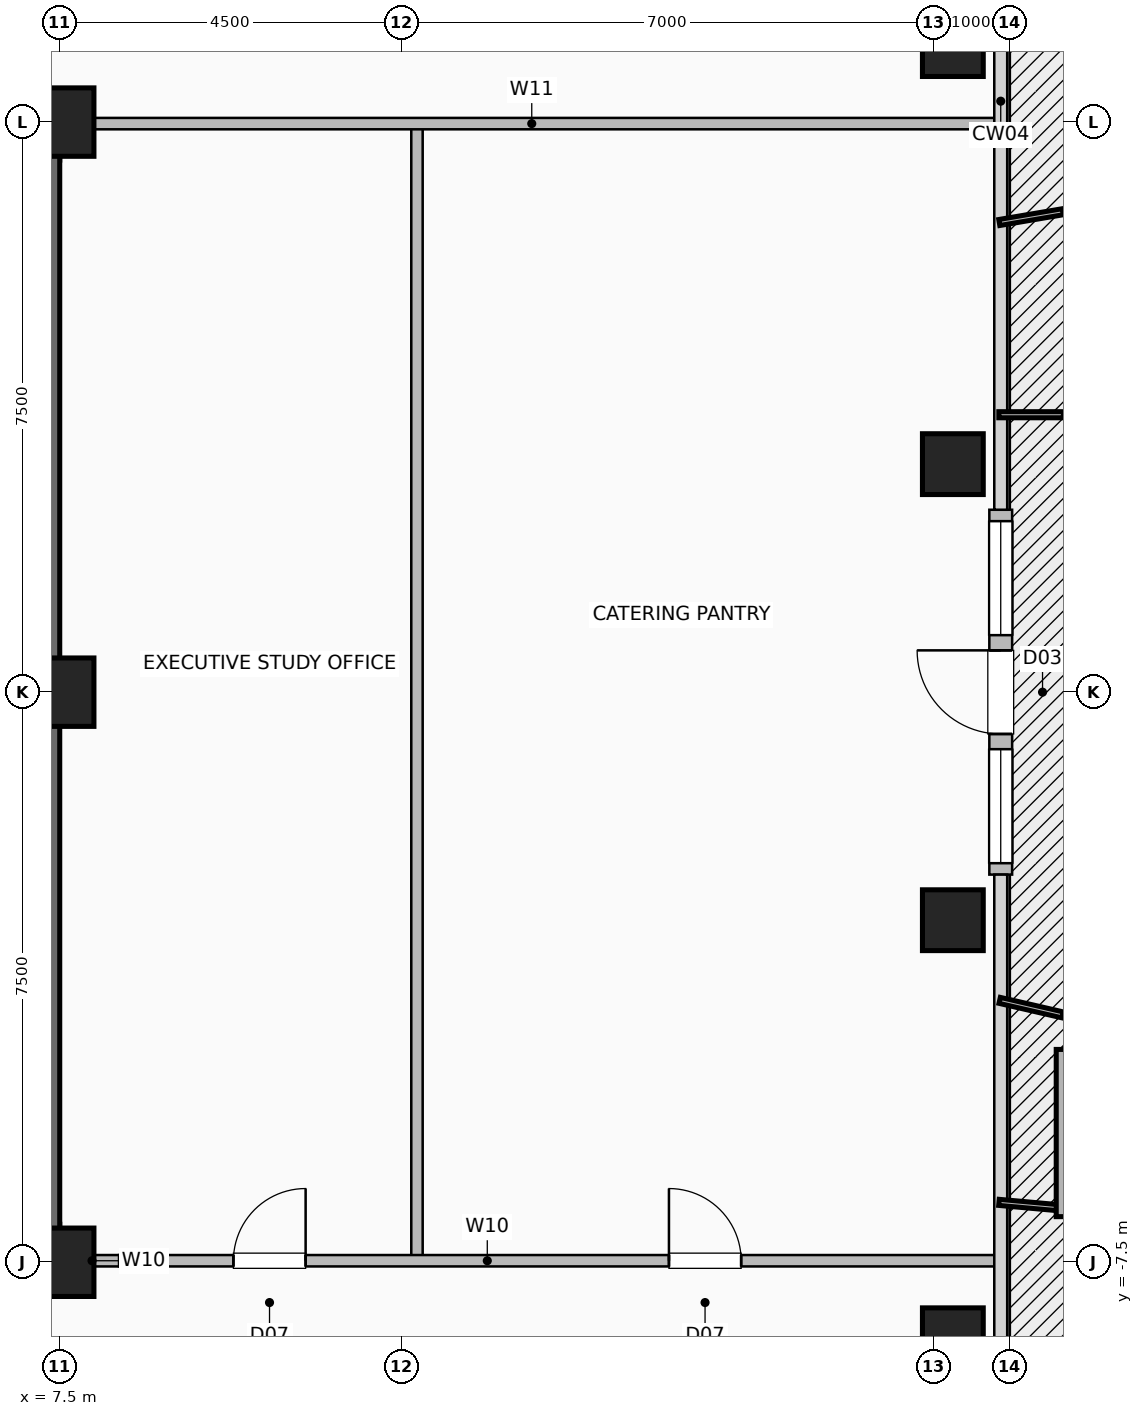
"""IFC4 building model, lengths in metres.
Left out: names, types, materials, properties, quantities, classifications, styles, units other than length and angle.
Written with IfcOpenShell. Run it as: python <this file> out.ifc"""

import sys

from ifc_helpers import new_model, si_unit, direction, frame, frame_2d, origin, origin_2d, place, context, subcontext, project, spatial, rectangle, hollow_rectangle, extrude, element, fill, save


model = new_model("IFC4")
c1 = context("Model", 3, precision=1e-05, world=origin(), true_north=direction((0.0, 1.0)))
c2 = subcontext(c1, "Body", "Model", "MODEL_VIEW")
j1 = project(units=[si_unit("LENGTHUNIT", "METRE"), si_unit("PLANEANGLEUNIT", "RADIAN")], contexts=[c1])
p1 = place(None, origin())
s1 = spatial("IfcSite", under=j1, at=p1, CompositionType="ELEMENT")
p2 = place(p1, origin())
s2 = spatial("IfcBuilding", under=s1, at=p2, CompositionType="ELEMENT")
p3 = place(p2, frame((0.0, 0.0, 195.0)))
s3 = spatial("IfcBuildingStorey", under=s2, at=p3, CompositionType="ELEMENT", Elevation=195.0)
for number, where, z_axis, x_axis in (
    (1, (7.5, -7.5, 0.0), (0.0, 0.0, 1.0), (1.0, 0.0, 0.0)),
    (2, (7.5, 0.0, 0.0), (0.0, 0.0, 1.0), (1.0, 0.0, 0.0)),
    (3, (7.5, 7.5, 0.0), (0.0, 0.0, 1.0), (1.0, 0.0, 0.0)),
):
    element("IfcColumn", number, at=place(p3, frame(where, z_axis=z_axis, x_axis=x_axis)), inside=s3, PredefinedType="COLUMN", context=c2, shape_type="SweptSolid", body=[
        extrude(hollow_rectangle(XDim=0.9, YDim=0.9, WallThickness=0.045, at=origin_2d()), origin(), (0.0, 0.0, 1.0), 3.6),
    ])
for number, where, z_axis, x_axis in (
    (4, (19.25, -8.5, 0.0), (0.0, 0.0, 1.0), (1.0, 0.0, 0.0)),
    (5, (19.25, -3.0, 0.0), (0.0, 0.0, 1.0), (1.0, 0.0, 0.0)),
    (6, (19.25, 3.0, 0.0), (0.0, 0.0, 1.0), (1.0, 0.0, 0.0)),
    (7, (19.25, 8.5, 0.0), (0.0, 0.0, 1.0), (1.0, 0.0, 0.0)),
):
    element("IfcColumn", number, at=place(p3, frame(where, z_axis=z_axis, x_axis=x_axis)), inside=s3, PredefinedType="COLUMN", context=c2, shape_type="SweptSolid", body=[
        extrude(hollow_rectangle(XDim=0.8, YDim=0.8, WallThickness=0.04, at=origin_2d()), origin(), (0.0, 0.0, 1.0), 3.6),
    ])
p4 = place(p3, frame((19.88, -2.4, 0.0), z_axis=(0.0, 0.0, 1.0), x_axis=(0.0, 1.0, 0.0)))
e8 = element("IfcWall", 8, at=p4, inside=s3, PredefinedType="SOLIDWALL", context=c2, shape_type="SweptSolid", body=[
    extrude(rectangle(XDim=4.8, YDim=0.3, at=frame_2d((2.4, 0.0))), origin(), (0.0, 0.0, 1.0), 3.36),
])
p5 = place(p4, frame((1.85, 0.0, 0.0)))
e9 = element("IfcOpeningElement", 9, at=p5, cuts=e8, PredefinedType="OPENING", context=c2, shape_type="SweptSolid", body=[
    extrude(rectangle(XDim=1.1, YDim=2.2, at=frame_2d((0.55, 1.1))), frame((0.0, 0.16, 0.0), z_axis=(0.0, -1.0, 0.0), x_axis=(1.0, 0.0, 0.0)), (0.0, 0.0, 1.0), 0.32),
])
p6 = place(p4, frame((0.15, 0.0, 0.85)))
e10 = element("IfcOpeningElement", 10, at=p6, cuts=e8, PredefinedType="OPENING", context=c2, shape_type="SweptSolid", body=[
    extrude(rectangle(XDim=1.5, YDim=1.8, at=frame_2d((0.75, 0.9))), frame((0.0, 0.16, 0.0), z_axis=(0.0, -1.0, 0.0), x_axis=(1.0, 0.0, 0.0)), (0.0, 0.0, 1.0), 0.32),
])
p7 = place(p4, frame((3.15, 0.0, 0.85)))
e11 = element("IfcOpeningElement", 11, at=p7, cuts=e8, PredefinedType="OPENING", context=c2, shape_type="SweptSolid", body=[
    extrude(rectangle(XDim=1.5, YDim=1.8, at=frame_2d((0.75, 0.9))), frame((0.0, 0.16, 0.0), z_axis=(0.0, -1.0, 0.0), x_axis=(1.0, 0.0, 0.0)), (0.0, 0.0, 1.0), 0.32),
])
p8 = place(p3, frame((-7.5, -7.25, 0.0), z_axis=(0.0, 0.0, 1.0), x_axis=(1.0, 0.0, 0.0)))
e12 = element("IfcWall", 12, at=p8, inside=s3, PredefinedType="SHEAR", context=c2, shape_type="SweptSolid", body=[
    extrude(rectangle(XDim=15.0, YDim=0.5, at=frame_2d((7.5, 0.0))), origin(), (0.0, 0.0, 1.0), 3.36),
])
p9 = place(p8, frame((1.55, 0.0, 0.0)))
e13 = element("IfcOpeningElement", 13, at=p9, cuts=e12, PredefinedType="OPENING", context=c2, shape_type="SweptSolid", body=[
    extrude(rectangle(XDim=1.05, YDim=2.08, at=frame_2d((0.525, 1.04))), frame((0.0, 0.26, 0.0), z_axis=(0.0, -1.0, 0.0), x_axis=(1.0, 0.0, 0.0)), (0.0, 0.0, 1.0), 0.52),
])
p10 = place(p8, frame((12.4, 0.0, 0.0)))
e14 = element("IfcOpeningElement", 14, at=p10, cuts=e12, PredefinedType="OPENING", context=c2, shape_type="SweptSolid", body=[
    extrude(rectangle(XDim=1.05, YDim=2.08, at=frame_2d((0.525, 1.04))), frame((0.0, 0.26, 0.0), z_axis=(0.0, -1.0, 0.0), x_axis=(1.0, 0.0, 0.0)), (0.0, 0.0, 1.0), 0.52),
])
p11 = place(p8, frame((5.2, 0.0, 0.0)))
e15 = element("IfcOpeningElement", 15, at=p11, cuts=e12, PredefinedType="OPENING", context=c2, shape_type="SweptSolid", body=[
    extrude(rectangle(XDim=1.0, YDim=2.08, at=frame_2d((0.5, 1.04))), frame((0.0, 0.26, 0.0), z_axis=(0.0, -1.0, 0.0), x_axis=(1.0, 0.0, 0.0)), (0.0, 0.0, 1.0), 0.52),
])
p12 = place(p8, frame((8.65, 0.0, 0.0)))
e16 = element("IfcOpeningElement", 16, at=p12, cuts=e12, PredefinedType="OPENING", context=c2, shape_type="SweptSolid", body=[
    extrude(rectangle(XDim=1.0, YDim=2.08, at=frame_2d((0.5, 1.04))), frame((0.0, 0.26, 0.0), z_axis=(0.0, -1.0, 0.0), x_axis=(1.0, 0.0, 0.0)), (0.0, 0.0, 1.0), 0.52),
])
for number, where, z_axis, x_axis in (
    (17, (-7.5, 7.25, 0.0), (0.0, 0.0, 1.0), (1.0, 0.0, 0.0)),
    (18, (7.25, -7.5, 0.0), (0.0, 0.0, 1.0), (0.0, 1.0, 0.0)),
):
    element("IfcWall", number, at=place(p3, frame(where, z_axis=z_axis, x_axis=x_axis)), inside=s3, PredefinedType="SHEAR", context=c2, shape_type="SweptSolid", body=[
        extrude(rectangle(XDim=15.0, YDim=0.5, at=frame_2d((7.5, 0.0))), origin(), (0.0, 0.0, 1.0), 3.36),
    ])
p13 = place(p3, frame((7.45, -7.48, 0.0), z_axis=(0.0, 0.0, 1.0), x_axis=(1.0, 0.0, 0.0)))
e19 = element("IfcWall", 19, at=p13, inside=s3, PredefinedType="PARTITIONING", context=c2, shape_type="SweptSolid", body=[
    extrude(rectangle(XDim=0.95, YDim=0.15, at=frame_2d((0.475, 0.0))), origin(), (0.0, 0.0, 1.0), 3.36),
])
p14 = place(p3, frame((12.2, -7.48, 0.0), z_axis=(0.0, 0.0, 1.0), x_axis=(0.0, 1.0, 0.0)))
e20 = element("IfcWall", 20, at=p14, inside=s3, PredefinedType="PARTITIONING", context=c2, shape_type="SweptSolid", body=[
    extrude(rectangle(XDim=14.9, YDim=0.15, at=frame_2d((7.45, 0.0))), origin(), (0.0, 0.0, 1.0), 3.36),
])
p15 = place(p3, frame((8.28, -7.48, 0.0), z_axis=(0.0, 0.0, 1.0), x_axis=(1.0, 0.0, 0.0)))
e21 = element("IfcWall", 21, at=p15, inside=s3, PredefinedType="PARTITIONING", context=c2, shape_type="SweptSolid", body=[
    extrude(rectangle(XDim=11.54, YDim=0.15, at=frame_2d((5.77, 0.0))), origin(), (0.0, 0.0, 1.0), 3.36),
])
p16 = place(p15, frame((1.505, 0.0, 0.0)))
e22 = element("IfcOpeningElement", 22, at=p16, cuts=e21, PredefinedType="OPENING", context=c2, shape_type="SweptSolid", body=[
    extrude(rectangle(XDim=0.95, YDim=2.06, at=frame_2d((0.475, 1.03))), frame((0.0, 0.085, 0.0), z_axis=(0.0, -1.0, 0.0), x_axis=(1.0, 0.0, 0.0)), (0.0, 0.0, 1.0), 0.17),
])
p17 = place(p15, frame((7.235, 0.0, 0.0)))
e23 = element("IfcOpeningElement", 23, at=p17, cuts=e21, PredefinedType="OPENING", context=c2, shape_type="SweptSolid", body=[
    extrude(rectangle(XDim=0.95, YDim=2.06, at=frame_2d((0.475, 1.03))), frame((0.0, 0.085, 0.0), z_axis=(0.0, -1.0, 0.0), x_axis=(1.0, 0.0, 0.0)), (0.0, 0.0, 1.0), 0.17),
])
p18 = place(p3, frame((7.6, 7.48, 0.0), z_axis=(0.0, 0.0, 1.0), x_axis=(1.0, 0.0, 0.0)))
e24 = element("IfcWall", 24, at=p18, inside=s3, PredefinedType="PARTITIONING", context=c2, shape_type="SweptSolid", body=[
    extrude(rectangle(XDim=12.22, YDim=0.15, at=frame_2d((6.11, 0.0))), origin(), (0.0, 0.0, 1.0), 3.36),
])
p19 = place(p5, origin())
e25 = element("IfcDoor", 25, at=p19, inside=s3, OperationType="SINGLE_SWING_RIGHT", PredefinedType="DOOR", context=c2, shape_type="SweptSolid", body=[
    extrude(rectangle(XDim=1.1, YDim=2.2, at=frame_2d((0.55, 1.1))), frame((0.0, 0.025, 0.0), z_axis=(0.0, -1.0, 0.0), x_axis=(1.0, 0.0, 0.0)), (0.0, 0.0, 1.0), 0.05),
])
fill(e9, e25)
p20 = place(p6, origin())
e26 = element("IfcWindow", 26, at=p20, inside=s3, PartitioningType="SINGLE_PANEL", PredefinedType="WINDOW", context=c2, shape_type="SweptSolid", body=[
    extrude(rectangle(XDim=1.5, YDim=1.8, at=frame_2d((0.75, 0.9))), frame((0.0, 0.03, 0.0), z_axis=(0.0, -1.0, 0.0), x_axis=(1.0, 0.0, 0.0)), (0.0, 0.0, 1.0), 0.06),
])
fill(e10, e26)
p21 = place(p7, origin())
e27 = element("IfcWindow", 27, at=p21, inside=s3, PartitioningType="SINGLE_PANEL", PredefinedType="WINDOW", context=c2, shape_type="SweptSolid", body=[
    extrude(rectangle(XDim=1.5, YDim=1.8, at=frame_2d((0.75, 0.9))), frame((0.0, 0.03, 0.0), z_axis=(0.0, -1.0, 0.0), x_axis=(1.0, 0.0, 0.0)), (0.0, 0.0, 1.0), 0.06),
])
fill(e11, e27)
p22 = place(p16, origin())
e28 = element("IfcDoor", 28, at=p22, inside=s3, OperationType="SINGLE_SWING_RIGHT", PredefinedType="DOOR", context=c2, shape_type="SweptSolid", body=[
    extrude(rectangle(XDim=0.95, YDim=2.06, at=frame_2d((0.475, 1.03))), frame((0.0, 0.025, 0.0), z_axis=(0.0, -1.0, 0.0), x_axis=(1.0, 0.0, 0.0)), (0.0, 0.0, 1.0), 0.05),
])
fill(e22, e28)
p23 = place(p17, origin())
e29 = element("IfcDoor", 29, at=p23, inside=s3, OperationType="SINGLE_SWING_LEFT", PredefinedType="DOOR", context=c2, shape_type="SweptSolid", body=[
    extrude(rectangle(XDim=0.95, YDim=2.06, at=frame_2d((0.475, 1.03))), frame((0.0, 0.025, 0.0), z_axis=(0.0, -1.0, 0.0), x_axis=(1.0, 0.0, 0.0)), (0.0, 0.0, 1.0), 0.05),
])
fill(e23, e29)
save(model, sys.argv[1])
